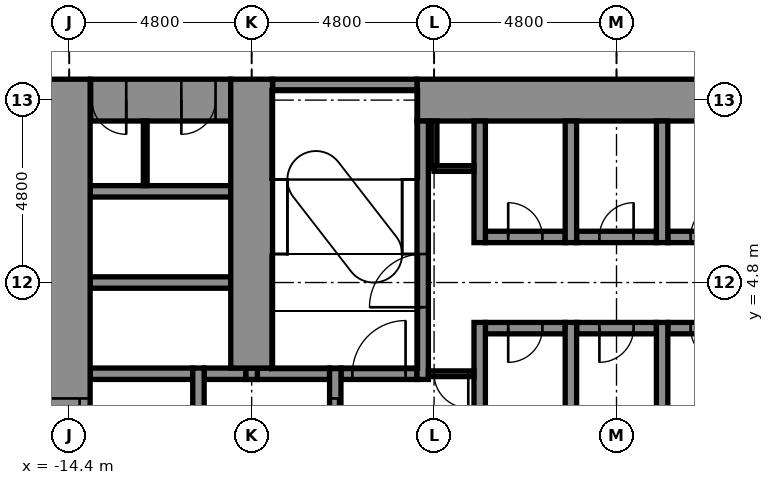
"""IFC4 building model, lengths in metres.
Left out: names, types, materials, properties, quantities, classifications, styles, units other than length and angle.
Written with IfcOpenShell. Run it as: python <this file> out.ifc"""

import sys

from ifc_helpers import new_model, si_unit, direction, frame, frame_2d, origin, place, context, subcontext, project, spatial, rectangle, extrude, element, fill, save


model = new_model("IFC4")
c1 = context("Model", 3, precision=1e-05, world=origin(), true_north=direction((0.0, 1.0)))
c2 = subcontext(c1, "Body", "Model", "MODEL_VIEW")
j1 = project(units=[si_unit("LENGTHUNIT", "METRE"), si_unit("PLANEANGLEUNIT", "RADIAN")], contexts=[c1])
p1 = place(None, origin())
s1 = spatial("IfcSite", under=j1, at=p1, CompositionType="ELEMENT")
p2 = place(p1, origin())
s2 = spatial("IfcBuilding", under=s1, at=p2, CompositionType="ELEMENT")
p3 = place(p2, frame((0.0, 0.0, 17.4)))
s3 = spatial("IfcBuildingStorey", under=s2, at=p3, CompositionType="ELEMENT", Elevation=17.4)
p4 = place(p3, frame((-13.85, 2.4, -0.25), z_axis=(0.0, 0.0, 1.0), x_axis=(1.0, 0.0, 0.0)))
e1 = element("IfcWall", 1, at=p4, inside=s3, PredefinedType="STANDARD", context=c2, shape_type="SweptSolid", body=[
    extrude(rectangle(XDim=2.7, YDim=0.3, at=frame_2d((1.35, 0.0))), origin(), (0.0, 0.0, 1.0), 5.0),
])
p5 = place(p3, frame((-10.85, 2.4, -0.25), z_axis=(0.0, 0.0, 1.0), x_axis=(1.0, 0.0, 0.0)))
e2 = element("IfcWall", 2, at=p5, inside=s3, PredefinedType="STANDARD", context=c2, shape_type="SweptSolid", body=[
    extrude(rectangle(XDim=1.1, YDim=0.3, at=frame_2d((0.55, 0.0))), origin(), (0.0, 0.0, 1.0), 5.0),
])
p6 = place(p3, frame((-9.45, 2.4, -0.25), z_axis=(0.0, 0.0, 1.0), x_axis=(1.0, 0.0, 0.0)))
e3 = element("IfcWall", 3, at=p6, inside=s3, PredefinedType="STANDARD", context=c2, shape_type="SweptSolid", body=[
    extrude(rectangle(XDim=1.9, YDim=0.3, at=frame_2d((0.95, 0.0))), origin(), (0.0, 0.0, 1.0), 5.0),
])
p7 = place(p3, frame((-7.25, 2.4, -0.25), z_axis=(0.0, 0.0, 1.0), x_axis=(1.0, 0.0, 0.0)))
e4 = element("IfcWall", 4, at=p7, inside=s3, PredefinedType="STANDARD", context=c2, shape_type="SweptSolid", body=[
    extrude(rectangle(XDim=2.0, YDim=0.3, at=frame_2d((1.0, 0.0))), origin(), (0.0, 0.0, 1.0), 5.0),
])
p8 = place(p7, frame((0.3, 0.0, 0.25)))
e5 = element("IfcOpeningElement", 5, at=p8, cuts=e4, PredefinedType="OPENING", context=c2, shape_type="SweptSolid", body=[
    extrude(rectangle(XDim=1.4, YDim=2.1, at=frame_2d((0.7, 1.05))), frame((0.0, 0.16, 0.0), z_axis=(0.0, -1.0, 0.0), x_axis=(1.0, 0.0, 0.0)), (0.0, 0.0, 1.0), 0.32),
])
p9 = place(p3, frame((-3.45, 3.6, -0.25), z_axis=(0.0, 0.0, 1.0), x_axis=(1.0, 0.0, 0.0)))
e6 = element("IfcWall", 6, at=p9, inside=s3, PredefinedType="STANDARD", context=c2, shape_type="SweptSolid", body=[
    extrude(rectangle(XDim=2.1, YDim=0.3, at=frame_2d((1.05, 0.0))), origin(), (0.0, 0.0, 1.0), 5.0),
])
p10 = place(p9, frame((0.6, 0.0, 0.25)))
e7 = element("IfcOpeningElement", 7, at=p10, cuts=e6, PredefinedType="OPENING", context=c2, shape_type="SweptSolid", body=[
    extrude(rectangle(XDim=0.9, YDim=2.1, at=frame_2d((0.45, 1.05))), frame((0.0, 0.16, 0.0), z_axis=(0.0, -1.0, 0.0), x_axis=(1.0, 0.0, 0.0)), (0.0, 0.0, 1.0), 0.32),
])
p11 = place(p3, frame((-1.05, 3.6, -0.25), z_axis=(0.0, 0.0, 1.0), x_axis=(1.0, 0.0, 0.0)))
e8 = element("IfcWall", 8, at=p11, inside=s3, PredefinedType="STANDARD", context=c2, shape_type="SweptSolid", body=[
    extrude(rectangle(XDim=2.1, YDim=0.3, at=frame_2d((1.05, 0.0))), origin(), (0.0, 0.0, 1.0), 5.0),
])
p12 = place(p11, frame((0.6, 0.0, 0.25)))
e9 = element("IfcOpeningElement", 9, at=p12, cuts=e8, PredefinedType="OPENING", context=c2, shape_type="SweptSolid", body=[
    extrude(rectangle(XDim=0.9, YDim=2.1, at=frame_2d((0.45, 1.05))), frame((0.0, 0.16, 0.0), z_axis=(0.0, -1.0, 0.0), x_axis=(1.0, 0.0, 0.0)), (0.0, 0.0, 1.0), 0.32),
])
p13 = place(p3, frame((1.35, 3.6, -0.25), z_axis=(0.0, 0.0, 1.0), x_axis=(1.0, 0.0, 0.0)))
e10 = element("IfcWall", 10, at=p13, inside=s3, PredefinedType="STANDARD", context=c2, shape_type="SweptSolid", body=[
    extrude(rectangle(XDim=2.1, YDim=0.3, at=frame_2d((1.05, 0.0))), origin(), (0.0, 0.0, 1.0), 5.0),
])
p14 = place(p13, frame((0.6, 0.0, 0.25)))
e11 = element("IfcOpeningElement", 11, at=p14, cuts=e10, PredefinedType="OPENING", context=c2, shape_type="SweptSolid", body=[
    extrude(rectangle(XDim=0.9, YDim=2.1, at=frame_2d((0.45, 1.05))), frame((0.0, 0.16, 0.0), z_axis=(0.0, -1.0, 0.0), x_axis=(1.0, 0.0, 0.0)), (0.0, 0.0, 1.0), 0.32),
])
p15 = place(p3, frame((-13.85, 4.8, -0.25), z_axis=(0.0, 0.0, 1.0), x_axis=(1.0, 0.0, 0.0)))
e12 = element("IfcWall", 12, at=p15, inside=s3, PredefinedType="STANDARD", context=c2, shape_type="SweptSolid", body=[
    extrude(rectangle(XDim=3.7, YDim=0.3, at=frame_2d((1.85, 0.0))), origin(), (0.0, 0.0, 1.0), 5.0),
])
p16 = place(p3, frame((-3.45, 6.0, -0.25), z_axis=(0.0, 0.0, 1.0), x_axis=(1.0, 0.0, 0.0)))
e13 = element("IfcWall", 13, at=p16, inside=s3, PredefinedType="STANDARD", context=c2, shape_type="SweptSolid", body=[
    extrude(rectangle(XDim=2.1, YDim=0.3, at=frame_2d((1.05, 0.0))), origin(), (0.0, 0.0, 1.0), 5.0),
])
p17 = place(p16, frame((0.6, 0.0, 0.25)))
e14 = element("IfcOpeningElement", 14, at=p17, cuts=e13, PredefinedType="OPENING", context=c2, shape_type="SweptSolid", body=[
    extrude(rectangle(XDim=0.9, YDim=2.1, at=frame_2d((0.45, 1.05))), frame((0.0, 0.16, 0.0), z_axis=(0.0, -1.0, 0.0), x_axis=(1.0, 0.0, 0.0)), (0.0, 0.0, 1.0), 0.32),
])
p18 = place(p3, frame((-1.05, 6.0, -0.25), z_axis=(0.0, 0.0, 1.0), x_axis=(1.0, 0.0, 0.0)))
e15 = element("IfcWall", 15, at=p18, inside=s3, PredefinedType="STANDARD", context=c2, shape_type="SweptSolid", body=[
    extrude(rectangle(XDim=2.1, YDim=0.3, at=frame_2d((1.05, 0.0))), origin(), (0.0, 0.0, 1.0), 5.0),
])
p19 = place(p18, frame((0.6, 0.0, 0.25)))
e16 = element("IfcOpeningElement", 16, at=p19, cuts=e15, PredefinedType="OPENING", context=c2, shape_type="SweptSolid", body=[
    extrude(rectangle(XDim=0.9, YDim=2.1, at=frame_2d((0.45, 1.05))), frame((0.0, 0.16, 0.0), z_axis=(0.0, -1.0, 0.0), x_axis=(1.0, 0.0, 0.0)), (0.0, 0.0, 1.0), 0.32),
])
p20 = place(p3, frame((1.35, 6.0, -0.25), z_axis=(0.0, 0.0, 1.0), x_axis=(1.0, 0.0, 0.0)))
e17 = element("IfcWall", 17, at=p20, inside=s3, PredefinedType="STANDARD", context=c2, shape_type="SweptSolid", body=[
    extrude(rectangle(XDim=2.1, YDim=0.3, at=frame_2d((1.05, 0.0))), origin(), (0.0, 0.0, 1.0), 5.0),
])
p21 = place(p20, frame((0.6, 0.0, 0.25)))
e18 = element("IfcOpeningElement", 18, at=p21, cuts=e17, PredefinedType="OPENING", context=c2, shape_type="SweptSolid", body=[
    extrude(rectangle(XDim=0.9, YDim=2.1, at=frame_2d((0.45, 1.05))), frame((0.0, 0.16, 0.0), z_axis=(0.0, -1.0, 0.0), x_axis=(1.0, 0.0, 0.0)), (0.0, 0.0, 1.0), 0.32),
])
p22 = place(p3, frame((-13.85, 7.2, -0.25), z_axis=(0.0, 0.0, 1.0), x_axis=(1.0, 0.0, 0.0)))
e19 = element("IfcWall", 19, at=p22, inside=s3, PredefinedType="STANDARD", context=c2, shape_type="SweptSolid", body=[
    extrude(rectangle(XDim=3.7, YDim=0.3, at=frame_2d((1.85, 0.0))), origin(), (0.0, 0.0, 1.0), 5.0),
])
p23 = place(p3, frame((-13.85, 9.6, -0.25), z_axis=(0.0, 0.0, 1.0), x_axis=(1.0, 0.0, 0.0)))
e20 = element("IfcWall", 20, at=p23, inside=s3, PredefinedType="SHEAR", context=c2, shape_type="SweptSolid", body=[
    extrude(rectangle(XDim=3.7, YDim=1.1, at=frame_2d((1.85, 0.0))), origin(), (0.0, 0.0, 1.0), 5.0),
])
p24 = place(p23, frame((0.05, 0.0, 0.25)))
e21 = element("IfcOpeningElement", 21, at=p24, cuts=e20, PredefinedType="OPENING", context=c2, shape_type="SweptSolid", body=[
    extrude(rectangle(XDim=0.9, YDim=2.1, at=frame_2d((0.45, 1.05))), frame((0.0, 0.56, 0.0), z_axis=(0.0, -1.0, 0.0), x_axis=(1.0, 0.0, 0.0)), (0.0, 0.0, 1.0), 1.12),
])
p25 = place(p23, frame((2.4, 0.0, 0.25)))
e22 = element("IfcOpeningElement", 22, at=p25, cuts=e20, PredefinedType="OPENING", context=c2, shape_type="SweptSolid", body=[
    extrude(rectangle(XDim=0.9, YDim=2.1, at=frame_2d((0.45, 1.05))), frame((0.0, 0.56, 0.0), z_axis=(0.0, -1.0, 0.0), x_axis=(1.0, 0.0, 0.0)), (0.0, 0.0, 1.0), 1.12),
])
p26 = place(p3, frame((-5.25, 9.6, -0.25), z_axis=(0.0, 0.0, 1.0), x_axis=(1.0, 0.0, 0.0)))
e23 = element("IfcWall", 23, at=p26, inside=s3, PredefinedType="SHEAR", context=c2, shape_type="SweptSolid", body=[
    extrude(rectangle(XDim=14.3, YDim=1.1, at=frame_2d((7.15, 0.0))), origin(), (0.0, 0.0, 1.0), 5.0),
])
p27 = place(p26, frame((9.35, 0.0, 0.25)))
e24 = element("IfcOpeningElement", 24, at=p27, cuts=e23, PredefinedType="OPENING", context=c2, shape_type="SweptSolid", body=[
    extrude(rectangle(XDim=1.4, YDim=2.1, at=frame_2d((0.7, 1.05))), frame((0.0, 0.56, 0.0), z_axis=(0.0, -1.0, 0.0), x_axis=(1.0, 0.0, 0.0)), (0.0, 0.0, 1.0), 1.12),
])
p28 = place(p3, frame((-9.05, 10.0, -0.25), z_axis=(0.0, 0.0, 1.0), x_axis=(1.0, 0.0, 0.0)))
e25 = element("IfcWall", 25, at=p28, inside=s3, PredefinedType="STANDARD", context=c2, shape_type="SweptSolid", body=[
    extrude(rectangle(XDim=3.8, YDim=0.3, at=frame_2d((1.9, 0.0))), origin(), (0.0, 0.0, 1.0), 5.0),
])
p29 = place(p3, frame((-14.4, -10.15, -0.25), z_axis=(0.0, 0.0, 1.0), x_axis=(0.0, 1.0, 0.0)))
e26 = element("IfcWall", 26, at=p29, inside=s3, PredefinedType="SHEAR", context=c2, shape_type="SweptSolid", body=[
    extrude(rectangle(XDim=20.3, YDim=1.1, at=frame_2d((10.15, 0.0))), origin(), (0.0, 0.0, 1.0), 5.0),
])
p30 = place(p29, frame((3.6, 0.0, 0.25)))
e27 = element("IfcOpeningElement", 27, at=p30, cuts=e26, PredefinedType="OPENING", context=c2, shape_type="SweptSolid", body=[
    extrude(rectangle(XDim=1.1, YDim=2.1, at=frame_2d((0.55, 1.05))), frame((0.0, 0.56, 0.0), z_axis=(0.0, -1.0, 0.0), x_axis=(1.0, 0.0, 0.0)), (0.0, 0.0, 1.0), 1.12),
])
p31 = place(p29, frame((6.0, 0.0, 0.25)))
e28 = element("IfcOpeningElement", 28, at=p31, cuts=e26, PredefinedType="OPENING", context=c2, shape_type="SweptSolid", body=[
    extrude(rectangle(XDim=1.1, YDim=2.1, at=frame_2d((0.55, 1.05))), frame((0.0, 0.56, 0.0), z_axis=(0.0, -1.0, 0.0), x_axis=(1.0, 0.0, 0.0)), (0.0, 0.0, 1.0), 1.12),
])
p32 = place(p29, frame((8.4, 0.0, 0.25)))
e29 = element("IfcOpeningElement", 29, at=p32, cuts=e26, PredefinedType="OPENING", context=c2, shape_type="SweptSolid", body=[
    extrude(rectangle(XDim=1.1, YDim=2.1, at=frame_2d((0.55, 1.05))), frame((0.0, 0.56, 0.0), z_axis=(0.0, -1.0, 0.0), x_axis=(1.0, 0.0, 0.0)), (0.0, 0.0, 1.0), 1.12),
])
p33 = place(p29, frame((10.8, 0.0, 0.25)))
e30 = element("IfcOpeningElement", 30, at=p33, cuts=e26, PredefinedType="OPENING", context=c2, shape_type="SweptSolid", body=[
    extrude(rectangle(XDim=1.1, YDim=2.1, at=frame_2d((0.55, 1.05))), frame((0.0, 0.56, 0.0), z_axis=(0.0, -1.0, 0.0), x_axis=(1.0, 0.0, 0.0)), (0.0, 0.0, 1.0), 1.12),
])
p34 = place(p3, frame((-11.0, -2.55, -0.25), z_axis=(0.0, 0.0, 1.0), x_axis=(0.0, 1.0, 0.0)))
e31 = element("IfcWall", 31, at=p34, inside=s3, PredefinedType="STANDARD", context=c2, shape_type="SweptSolid", body=[
    extrude(rectangle(XDim=5.1, YDim=0.3, at=frame_2d((2.55, 0.0))), origin(), (0.0, 0.0, 1.0), 5.0),
])
p35 = place(p3, frame((-9.6, 2.25, -0.25), z_axis=(0.0, 0.0, 1.0), x_axis=(0.0, 1.0, 0.0)))
e32 = element("IfcWall", 32, at=p35, inside=s3, PredefinedType="STANDARD", context=c2, shape_type="SweptSolid", body=[
    extrude(rectangle(XDim=0.3, YDim=0.3, at=frame_2d((0.15, 0.0))), origin(), (0.0, 0.0, 1.0), 5.0),
])
p36 = place(p3, frame((-9.6, 2.55, -0.25), z_axis=(0.0, 0.0, 1.0), x_axis=(0.0, 1.0, 0.0)))
e33 = element("IfcWall", 33, at=p36, inside=s3, PredefinedType="SHEAR", context=c2, shape_type="SweptSolid", body=[
    extrude(rectangle(XDim=7.6, YDim=1.1, at=frame_2d((3.8, 0.0))), origin(), (0.0, 0.0, 1.0), 5.0),
])
p37 = place(p3, frame((-7.4, -2.55, -0.25), z_axis=(0.0, 0.0, 1.0), x_axis=(0.0, 1.0, 0.0)))
e34 = element("IfcWall", 34, at=p37, inside=s3, PredefinedType="STANDARD", context=c2, shape_type="SweptSolid", body=[
    extrude(rectangle(XDim=5.1, YDim=0.3, at=frame_2d((2.55, 0.0))), origin(), (0.0, 0.0, 1.0), 5.0),
])
p38 = place(p37, frame((0.8, 0.0, 0.25)))
e35 = element("IfcOpeningElement", 35, at=p38, cuts=e34, PredefinedType="OPENING", context=c2, shape_type="SweptSolid", body=[
    extrude(rectangle(XDim=1.1, YDim=2.1, at=frame_2d((0.55, 1.05))), frame((0.0, 0.16, 0.0), z_axis=(0.0, -1.0, 0.0), x_axis=(1.0, 0.0, 0.0)), (0.0, 0.0, 1.0), 0.32),
])
p39 = place(p37, frame((3.2, 0.0, 0.25)))
e36 = element("IfcOpeningElement", 36, at=p39, cuts=e34, PredefinedType="OPENING", context=c2, shape_type="SweptSolid", body=[
    extrude(rectangle(XDim=1.1, YDim=2.1, at=frame_2d((0.55, 1.05))), frame((0.0, 0.16, 0.0), z_axis=(0.0, -1.0, 0.0), x_axis=(1.0, 0.0, 0.0)), (0.0, 0.0, 1.0), 0.32),
])
p40 = place(p3, frame((-5.1, 2.25, -0.25), z_axis=(0.0, 0.0, 1.0), x_axis=(0.0, 1.0, 0.0)))
e37 = element("IfcWall", 37, at=p40, inside=s3, PredefinedType="STANDARD", context=c2, shape_type="SweptSolid", body=[
    extrude(rectangle(XDim=6.8, YDim=0.3, at=frame_2d((3.4, 0.0))), origin(), (0.0, 0.0, 1.0), 5.0),
])
p41 = place(p40, frame((1.9, 0.0, 0.25)))
e38 = element("IfcOpeningElement", 38, at=p41, cuts=e37, PredefinedType="OPENING", context=c2, shape_type="SweptSolid", body=[
    extrude(rectangle(XDim=1.4, YDim=2.1, at=frame_2d((0.7, 1.05))), frame((0.0, 0.16, 0.0), z_axis=(0.0, -1.0, 0.0), x_axis=(1.0, 0.0, 0.0)), (0.0, 0.0, 1.0), 0.32),
])
p42 = place(p3, frame((-3.6, -3.75, -0.25), z_axis=(0.0, 0.0, 1.0), x_axis=(0.0, 1.0, 0.0)))
e39 = element("IfcWall", 39, at=p42, inside=s3, PredefinedType="STANDARD", context=c2, shape_type="SweptSolid", body=[
    extrude(rectangle(XDim=7.5, YDim=0.3, at=frame_2d((3.75, 0.0))), origin(), (0.0, 0.0, 1.0), 5.0),
])
p43 = place(p3, frame((-3.6, 5.85, -0.25), z_axis=(0.0, 0.0, 1.0), x_axis=(0.0, 1.0, 0.0)))
e40 = element("IfcWall", 40, at=p43, inside=s3, PredefinedType="STANDARD", context=c2, shape_type="SweptSolid", body=[
    extrude(rectangle(XDim=3.2, YDim=0.3, at=frame_2d((1.6, 0.0))), origin(), (0.0, 0.0, 1.0), 5.0),
])
p44 = place(p3, frame((-1.2, -3.75, -0.25), z_axis=(0.0, 0.0, 1.0), x_axis=(0.0, 1.0, 0.0)))
e41 = element("IfcWall", 41, at=p44, inside=s3, PredefinedType="STANDARD", context=c2, shape_type="SweptSolid", body=[
    extrude(rectangle(XDim=7.5, YDim=0.3, at=frame_2d((3.75, 0.0))), origin(), (0.0, 0.0, 1.0), 5.0),
])
p45 = place(p3, frame((-1.2, 5.85, -0.25), z_axis=(0.0, 0.0, 1.0), x_axis=(0.0, 1.0, 0.0)))
e42 = element("IfcWall", 42, at=p45, inside=s3, PredefinedType="STANDARD", context=c2, shape_type="SweptSolid", body=[
    extrude(rectangle(XDim=3.2, YDim=0.3, at=frame_2d((1.6, 0.0))), origin(), (0.0, 0.0, 1.0), 5.0),
])
p46 = place(p3, frame((1.2, -3.75, -0.25), z_axis=(0.0, 0.0, 1.0), x_axis=(0.0, 1.0, 0.0)))
e43 = element("IfcWall", 43, at=p46, inside=s3, PredefinedType="STANDARD", context=c2, shape_type="SweptSolid", body=[
    extrude(rectangle(XDim=7.5, YDim=0.3, at=frame_2d((3.75, 0.0))), origin(), (0.0, 0.0, 1.0), 5.0),
])
p47 = place(p3, frame((1.2, 5.85, -0.25), z_axis=(0.0, 0.0, 1.0), x_axis=(0.0, 1.0, 0.0)))
e44 = element("IfcWall", 44, at=p47, inside=s3, PredefinedType="STANDARD", context=c2, shape_type="SweptSolid", body=[
    extrude(rectangle(XDim=3.2, YDim=0.3, at=frame_2d((1.6, 0.0))), origin(), (0.0, 0.0, 1.0), 5.0),
])
p48 = place(p3, frame((-4.8, 7.8, 0.0), z_axis=(0.0, 0.0, 1.0), x_axis=(0.0, 1.0, 0.0)))
e45 = element("IfcWall", 45, at=p48, inside=s3, PredefinedType="PARTITIONING", context=c2, shape_type="SweptSolid", body=[
    extrude(rectangle(XDim=1.25, YDim=0.15, at=frame_2d((0.625, 0.0))), origin(), (0.0, 0.0, 1.0), 4.75),
])
p49 = place(p3, frame((-12.4, 7.35, 0.0), z_axis=(0.0, 0.0, 1.0), x_axis=(0.0, 1.0, 0.0)))
e46 = element("IfcWall", 46, at=p49, inside=s3, PredefinedType="PARTITIONING", context=c2, shape_type="SweptSolid", body=[
    extrude(rectangle(XDim=1.7, YDim=0.1, at=frame_2d((0.85, 0.0))), origin(), (0.0, 0.0, 1.0), 4.75),
])
p50 = place(p3, frame((-4.8, 7.8, 0.0), z_axis=(0.0, 0.0, 1.0), x_axis=(1.0, 0.0, 0.0)))
e47 = element("IfcWall", 47, at=p50, inside=s3, PredefinedType="PARTITIONING", context=c2, shape_type="SweptSolid", body=[
    extrude(rectangle(XDim=1.05, YDim=0.15, at=frame_2d((0.525, 0.0))), origin(), (0.0, 0.0, 1.0), 4.75),
])
p51 = place(p3, frame((-4.95, 2.4, 0.0), z_axis=(0.0, 0.0, 1.0), x_axis=(1.0, 0.0, 0.0)))
e48 = element("IfcWall", 48, at=p51, inside=s3, PredefinedType="PARTITIONING", context=c2, shape_type="SweptSolid", body=[
    extrude(rectangle(XDim=1.2, YDim=0.15, at=frame_2d((0.6, 0.0))), origin(), (0.0, 0.0, 1.0), 4.75),
])
p52 = place(p51, frame((0.15, 0.0, 0.0)))
e49 = element("IfcOpeningElement", 49, at=p52, cuts=e48, PredefinedType="OPENING", context=c2, shape_type="SweptSolid", body=[
    extrude(rectangle(XDim=0.9, YDim=2.1, at=frame_2d((0.45, 1.05))), frame((0.0, 0.085, 0.0), z_axis=(0.0, -1.0, 0.0), x_axis=(1.0, 0.0, 0.0)), (0.0, 0.0, 1.0), 0.17),
])
p53 = place(p39, origin())
e50 = element("IfcDoor", 50, at=p53, inside=s3, OperationType="DOUBLE_DOOR_SLIDING", PredefinedType="DOOR", context=c2, shape_type="SweptSolid", body=[
    extrude(rectangle(XDim=1.1, YDim=2.1, at=frame_2d((0.55, 1.05))), frame((0.0, 0.025, 0.0), z_axis=(0.0, -1.0, 0.0), x_axis=(1.0, 0.0, 0.0)), (0.0, 0.0, 1.0), 0.05),
])
fill(e36, e50)
p54 = place(p33, origin())
e51 = element("IfcDoor", 51, at=p54, inside=s3, OperationType="DOUBLE_DOOR_SLIDING", PredefinedType="DOOR", context=c2, shape_type="SweptSolid", body=[
    extrude(rectangle(XDim=1.1, YDim=2.1, at=frame_2d((0.55, 1.05))), frame((0.0, 0.025, 0.0), z_axis=(0.0, -1.0, 0.0), x_axis=(1.0, 0.0, 0.0)), (0.0, 0.0, 1.0), 0.05),
])
fill(e30, e51)
p55 = place(p41, origin())
e52 = element("IfcDoor", 52, at=p55, inside=s3, OperationType="SINGLE_SWING_LEFT", PredefinedType="DOOR", context=c2, shape_type="SweptSolid", body=[
    extrude(rectangle(XDim=1.4, YDim=2.1, at=frame_2d((0.7, 1.05))), frame((0.0, 0.025, 0.0), z_axis=(0.0, -1.0, 0.0), x_axis=(1.0, 0.0, 0.0)), (0.0, 0.0, 1.0), 0.05),
])
fill(e38, e52)
p56 = place(p17, origin())
e53 = element("IfcDoor", 53, at=p56, inside=s3, OperationType="SINGLE_SWING_LEFT", PredefinedType="DOOR", context=c2, shape_type="SweptSolid", body=[
    extrude(rectangle(XDim=0.9, YDim=2.1, at=frame_2d((0.45, 1.05))), frame((0.0, 0.025, 0.0), z_axis=(0.0, -1.0, 0.0), x_axis=(1.0, 0.0, 0.0)), (0.0, 0.0, 1.0), 0.05),
])
fill(e14, e53)
p57 = place(p19, origin())
e54 = element("IfcDoor", 54, at=p57, inside=s3, OperationType="SINGLE_SWING_RIGHT", PredefinedType="DOOR", context=c2, shape_type="SweptSolid", body=[
    extrude(rectangle(XDim=0.9, YDim=2.1, at=frame_2d((0.45, 1.05))), frame((0.0, 0.025, 0.0), z_axis=(0.0, -1.0, 0.0), x_axis=(1.0, 0.0, 0.0)), (0.0, 0.0, 1.0), 0.05),
])
fill(e16, e54)
p58 = place(p21, origin())
e55 = element("IfcDoor", 55, at=p58, inside=s3, OperationType="SINGLE_SWING_RIGHT", PredefinedType="DOOR", context=c2, shape_type="SweptSolid", body=[
    extrude(rectangle(XDim=0.9, YDim=2.1, at=frame_2d((0.45, 1.05))), frame((0.0, 0.025, 0.0), z_axis=(0.0, -1.0, 0.0), x_axis=(1.0, 0.0, 0.0)), (0.0, 0.0, 1.0), 0.05),
])
fill(e18, e55)
p59 = place(p10, frame((0.9, 0.0, 0.0), z_axis=(0.0, 0.0, 1.0), x_axis=(-1.0, 0.0, 0.0)))
e56 = element("IfcDoor", 56, at=p59, inside=s3, OperationType="SINGLE_SWING_LEFT", PredefinedType="DOOR", context=c2, shape_type="SweptSolid", body=[
    extrude(rectangle(XDim=0.9, YDim=2.1, at=frame_2d((0.45, 1.05))), frame((0.0, 0.025, 0.0), z_axis=(0.0, -1.0, 0.0), x_axis=(1.0, 0.0, 0.0)), (0.0, 0.0, 1.0), 0.05),
])
fill(e7, e56)
p60 = place(p12, frame((0.9, 0.0, 0.0), z_axis=(0.0, 0.0, 1.0), x_axis=(-1.0, 0.0, 0.0)))
e57 = element("IfcDoor", 57, at=p60, inside=s3, OperationType="SINGLE_SWING_LEFT", PredefinedType="DOOR", context=c2, shape_type="SweptSolid", body=[
    extrude(rectangle(XDim=0.9, YDim=2.1, at=frame_2d((0.45, 1.05))), frame((0.0, 0.025, 0.0), z_axis=(0.0, -1.0, 0.0), x_axis=(1.0, 0.0, 0.0)), (0.0, 0.0, 1.0), 0.05),
])
fill(e9, e57)
p61 = place(p14, frame((0.9, 0.0, 0.0), z_axis=(0.0, 0.0, 1.0), x_axis=(-1.0, 0.0, 0.0)))
e58 = element("IfcDoor", 58, at=p61, inside=s3, OperationType="SINGLE_SWING_RIGHT", PredefinedType="DOOR", context=c2, shape_type="SweptSolid", body=[
    extrude(rectangle(XDim=0.9, YDim=2.1, at=frame_2d((0.45, 1.05))), frame((0.0, 0.025, 0.0), z_axis=(0.0, -1.0, 0.0), x_axis=(1.0, 0.0, 0.0)), (0.0, 0.0, 1.0), 0.05),
])
fill(e11, e58)
p62 = place(p24, frame((0.9, 0.0, 0.0), z_axis=(0.0, 0.0, 1.0), x_axis=(-1.0, 0.0, 0.0)))
e59 = element("IfcDoor", 59, at=p62, inside=s3, OperationType="SINGLE_SWING_RIGHT", PredefinedType="DOOR", context=c2, shape_type="SweptSolid", body=[
    extrude(rectangle(XDim=0.9, YDim=2.1, at=frame_2d((0.45, 1.05))), frame((0.0, 0.025, 0.0), z_axis=(0.0, -1.0, 0.0), x_axis=(1.0, 0.0, 0.0)), (0.0, 0.0, 1.0), 0.05),
])
fill(e21, e59)
p63 = place(p25, frame((0.9, 0.0, 0.0), z_axis=(0.0, 0.0, 1.0), x_axis=(-1.0, 0.0, 0.0)))
e60 = element("IfcDoor", 60, at=p63, inside=s3, OperationType="SINGLE_SWING_LEFT", PredefinedType="DOOR", context=c2, shape_type="SweptSolid", body=[
    extrude(rectangle(XDim=0.9, YDim=2.1, at=frame_2d((0.45, 1.05))), frame((0.0, 0.025, 0.0), z_axis=(0.0, -1.0, 0.0), x_axis=(1.0, 0.0, 0.0)), (0.0, 0.0, 1.0), 0.05),
])
fill(e22, e60)
p64 = place(p52, frame((0.9, 0.0, 0.0), z_axis=(0.0, 0.0, 1.0), x_axis=(-1.0, 0.0, 0.0)))
e61 = element("IfcDoor", 61, at=p64, inside=s3, OperationType="SINGLE_SWING_RIGHT", PredefinedType="DOOR", context=c2, shape_type="SweptSolid", body=[
    extrude(rectangle(XDim=0.9, YDim=2.1, at=frame_2d((0.45, 1.05))), frame((0.0, 0.025, 0.0), z_axis=(0.0, -1.0, 0.0), x_axis=(1.0, 0.0, 0.0)), (0.0, 0.0, 1.0), 0.05),
])
fill(e49, e61)
p65 = place(p8, origin())
e62 = element("IfcDoor", 62, at=p65, inside=s3, OperationType="SINGLE_SWING_RIGHT", PredefinedType="DOOR", context=c2, shape_type="SweptSolid", body=[
    extrude(rectangle(XDim=1.4, YDim=2.1, at=frame_2d((0.7, 1.05))), frame((0.0, 0.025, 0.0), z_axis=(0.0, -1.0, 0.0), x_axis=(1.0, 0.0, 0.0)), (0.0, 0.0, 1.0), 0.05),
])
fill(e5, e62)
save(model, sys.argv[1])
